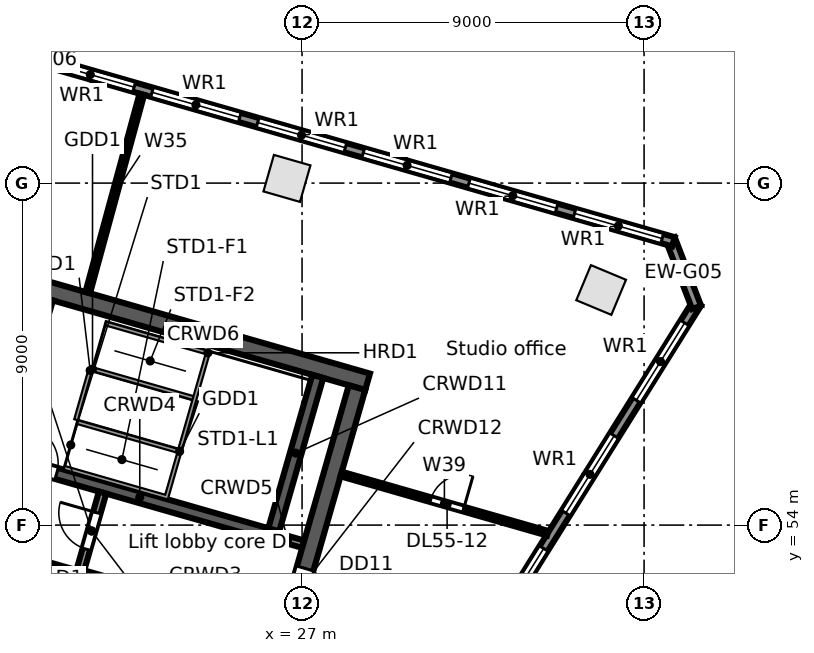
"""IFC4 building model, lengths in metres.
Left out: names, types, materials, properties, quantities, classifications, styles, units other than length and angle.
Written with IfcOpenShell. Run it as: python <this file> out.ifc"""

import sys

from ifc_helpers import new_model, si_unit, direction, frame, frame_2d, origin, origin_2d, place, context, subcontext, project, spatial, rectangle, extrude, element, fill, save


model = new_model("IFC4")
c1 = context("Model", 3, precision=1e-05, world=origin(), true_north=direction((0.0, 1.0)))
c2 = subcontext(c1, "Body", "Model", "MODEL_VIEW")
j1 = project(units=[si_unit("LENGTHUNIT", "METRE"), si_unit("PLANEANGLEUNIT", "RADIAN")], contexts=[c1])
p1 = place(None, origin())
s1 = spatial("IfcSite", under=j1, at=p1, CompositionType="ELEMENT")
p2 = place(p1, origin())
s2 = spatial("IfcBuilding", under=s1, at=p2, CompositionType="ELEMENT")
p3 = place(p2, frame((0.0, 0.0, 250.4)))
s3 = spatial("IfcBuildingStorey", under=s2, at=p3, CompositionType="ELEMENT", Elevation=250.4)
for number, where, z_axis, x_axis in (
    (1, (26.603, 63.124, 0.0), (0.0, 0.0, 1.0), (-0.961, 0.276, 0.0)),
    (2, (34.87, 60.187, 0.0), (0.0, 0.0, 1.0), (-0.923, 0.385, 0.0)),
):
    element("IfcColumn", number, at=place(p3, frame(where, z_axis=z_axis, x_axis=x_axis)), inside=s3, PredefinedType="COLUMN", context=c2, shape_type="SweptSolid", body=[
        extrude(rectangle(XDim=1.0, YDim=1.0, at=origin_2d()), origin(), (0.0, 0.0, 1.0), 3.9),
    ])
p4 = place(p3, frame((37.392, 59.84, 0.0), z_axis=(0.0, 0.0, 1.0), x_axis=(-0.529919909431, -0.848047692992, 0.0)))
e3 = element("IfcWall", 3, at=p4, inside=s3, PredefinedType="STANDARD", context=c2, shape_type="SweptSolid", body=[
    extrude(rectangle(XDim=21.104, YDim=0.25, at=frame_2d((10.552, 0.0))), origin(), (0.0, 0.0, 1.0), 3.62),
])
p5 = place(p4, frame((18.112, 0.0, 0.8)))
e4 = element("IfcOpeningElement", 4, at=p5, cuts=e3, PredefinedType="OPENING", context=c2, shape_type="SweptSolid", body=[
    extrude(rectangle(XDim=2.4, YDim=2.2, at=frame_2d((1.2, 1.1))), frame((0.0, 0.135, 0.0), z_axis=(0.0, -1.0, 0.0), x_axis=(1.0, 0.0, 0.0)), (0.0, 0.0, 1.0), 0.27),
])
p6 = place(p4, frame((14.612, 0.0, 0.8)))
e5 = element("IfcOpeningElement", 5, at=p6, cuts=e3, PredefinedType="OPENING", context=c2, shape_type="SweptSolid", body=[
    extrude(rectangle(XDim=2.4, YDim=2.2, at=frame_2d((1.2, 1.1))), frame((0.0, 0.135, 0.0), z_axis=(0.0, -1.0, 0.0), x_axis=(1.0, 0.0, 0.0)), (0.0, 0.0, 1.0), 0.27),
])
p7 = place(p4, frame((11.112, 0.0, 0.8)))
e6 = element("IfcOpeningElement", 6, at=p7, cuts=e3, PredefinedType="OPENING", context=c2, shape_type="SweptSolid", body=[
    extrude(rectangle(XDim=2.4, YDim=2.2, at=frame_2d((1.2, 1.1))), frame((0.0, 0.135, 0.0), z_axis=(0.0, -1.0, 0.0), x_axis=(1.0, 0.0, 0.0)), (0.0, 0.0, 1.0), 0.27),
])
p8 = place(p4, frame((7.612, 0.0, 0.8)))
e7 = element("IfcOpeningElement", 7, at=p8, cuts=e3, PredefinedType="OPENING", context=c2, shape_type="SweptSolid", body=[
    extrude(rectangle(XDim=2.4, YDim=2.2, at=frame_2d((1.2, 1.1))), frame((0.0, 0.135, 0.0), z_axis=(0.0, -1.0, 0.0), x_axis=(1.0, 0.0, 0.0)), (0.0, 0.0, 1.0), 0.27),
])
p9 = place(p4, frame((4.112, 0.0, 0.8)))
e8 = element("IfcOpeningElement", 8, at=p9, cuts=e3, PredefinedType="OPENING", context=c2, shape_type="SweptSolid", body=[
    extrude(rectangle(XDim=2.4, YDim=2.2, at=frame_2d((1.2, 1.1))), frame((0.0, 0.135, 0.0), z_axis=(0.0, -1.0, 0.0), x_axis=(1.0, 0.0, 0.0)), (0.0, 0.0, 1.0), 0.27),
])
p10 = place(p4, frame((0.612, 0.0, 0.8)))
e9 = element("IfcOpeningElement", 9, at=p10, cuts=e3, PredefinedType="OPENING", context=c2, shape_type="SweptSolid", body=[
    extrude(rectangle(XDim=2.4, YDim=2.2, at=frame_2d((1.2, 1.1))), frame((0.0, 0.135, 0.0), z_axis=(0.0, -1.0, 0.0), x_axis=(1.0, 0.0, 0.0)), (0.0, 0.0, 1.0), 0.27),
])
p11 = place(p3, frame((36.69, 61.531, 0.0), z_axis=(0.0, 0.0, 1.0), x_axis=(0.358377147136, -0.933576895821, 0.0)))
e10 = element("IfcWall", 10, at=p11, inside=s3, PredefinedType="STANDARD", context=c2, shape_type="SweptSolid", body=[
    extrude(rectangle(XDim=1.93, YDim=0.25, at=frame_2d((0.965, 0.0))), origin(), (0.0, 0.0, 1.0), 3.62),
])
p12 = place(p3, frame((3.34, 71.042, 0.0), z_axis=(0.0, 0.0, 1.0), x_axis=(0.96126179431, -0.275637012753, 0.0)))
e11 = element("IfcWall", 11, at=p12, inside=s3, PredefinedType="STANDARD", context=c2, shape_type="SweptSolid", body=[
    extrude(rectangle(XDim=34.779, YDim=0.25, at=frame_2d((17.39, 0.0))), origin(), (0.0, 0.0, 1.0), 3.62),
])
p13 = place(p12, frame((32.071, 0.0, 0.8)))
e12 = element("IfcOpeningElement", 12, at=p13, cuts=e11, PredefinedType="OPENING", context=c2, shape_type="SweptSolid", body=[
    extrude(rectangle(XDim=2.4, YDim=2.2, at=frame_2d((1.2, 1.1))), frame((0.0, 0.135, 0.0), z_axis=(0.0, -1.0, 0.0), x_axis=(1.0, 0.0, 0.0)), (0.0, 0.0, 1.0), 0.27),
])
p14 = place(p12, frame((29.18, 0.0, 0.8)))
e13 = element("IfcOpeningElement", 13, at=p14, cuts=e11, PredefinedType="OPENING", context=c2, shape_type="SweptSolid", body=[
    extrude(rectangle(XDim=2.4, YDim=2.2, at=frame_2d((1.2, 1.1))), frame((0.0, 0.135, 0.0), z_axis=(0.0, -1.0, 0.0), x_axis=(1.0, 0.0, 0.0)), (0.0, 0.0, 1.0), 0.27),
])
p15 = place(p12, frame((26.289, 0.0, 0.8)))
e14 = element("IfcOpeningElement", 14, at=p15, cuts=e11, PredefinedType="OPENING", context=c2, shape_type="SweptSolid", body=[
    extrude(rectangle(XDim=2.4, YDim=2.2, at=frame_2d((1.2, 1.1))), frame((0.0, 0.135, 0.0), z_axis=(0.0, -1.0, 0.0), x_axis=(1.0, 0.0, 0.0)), (0.0, 0.0, 1.0), 0.27),
])
p16 = place(p12, frame((23.398, 0.0, 0.8)))
e15 = element("IfcOpeningElement", 15, at=p16, cuts=e11, PredefinedType="OPENING", context=c2, shape_type="SweptSolid", body=[
    extrude(rectangle(XDim=2.4, YDim=2.2, at=frame_2d((1.2, 1.1))), frame((0.0, 0.135, 0.0), z_axis=(0.0, -1.0, 0.0), x_axis=(1.0, 0.0, 0.0)), (0.0, 0.0, 1.0), 0.27),
])
p17 = place(p12, frame((20.508, 0.0, 0.8)))
e16 = element("IfcOpeningElement", 16, at=p17, cuts=e11, PredefinedType="OPENING", context=c2, shape_type="SweptSolid", body=[
    extrude(rectangle(XDim=2.4, YDim=2.2, at=frame_2d((1.2, 1.1))), frame((0.0, 0.135, 0.0), z_axis=(0.0, -1.0, 0.0), x_axis=(1.0, 0.0, 0.0)), (0.0, 0.0, 1.0), 0.27),
])
p18 = place(p12, frame((17.616, 0.0, 0.8)))
e17 = element("IfcOpeningElement", 17, at=p18, cuts=e11, PredefinedType="OPENING", context=c2, shape_type="SweptSolid", body=[
    extrude(rectangle(XDim=2.4, YDim=2.2, at=frame_2d((1.2, 1.1))), frame((0.0, 0.135, 0.0), z_axis=(0.0, -1.0, 0.0), x_axis=(1.0, 0.0, 0.0)), (0.0, 0.0, 1.0), 0.27),
])
p19 = place(p12, frame((14.726, 0.0, 0.8)))
e18 = element("IfcOpeningElement", 18, at=p19, cuts=e11, PredefinedType="OPENING", context=c2, shape_type="SweptSolid", body=[
    extrude(rectangle(XDim=2.4, YDim=2.2, at=frame_2d((1.2, 1.1))), frame((0.0, 0.135, 0.0), z_axis=(0.0, -1.0, 0.0), x_axis=(1.0, 0.0, 0.0)), (0.0, 0.0, 1.0), 0.27),
])
p20 = place(p12, frame((11.834, 0.0, 0.8)))
e19 = element("IfcOpeningElement", 19, at=p20, cuts=e11, PredefinedType="OPENING", context=c2, shape_type="SweptSolid", body=[
    extrude(rectangle(XDim=2.4, YDim=2.2, at=frame_2d((1.2, 1.1))), frame((0.0, 0.135, 0.0), z_axis=(0.0, -1.0, 0.0), x_axis=(1.0, 0.0, 0.0)), (0.0, 0.0, 1.0), 0.27),
])
p21 = place(p12, frame((8.944, 0.0, 0.8)))
e20 = element("IfcOpeningElement", 20, at=p21, cuts=e11, PredefinedType="OPENING", context=c2, shape_type="SweptSolid", body=[
    extrude(rectangle(XDim=2.4, YDim=2.2, at=frame_2d((1.2, 1.1))), frame((0.0, 0.135, 0.0), z_axis=(0.0, -1.0, 0.0), x_axis=(1.0, 0.0, 0.0)), (0.0, 0.0, 1.0), 0.27),
])
p22 = place(p12, frame((6.052, 0.0, 0.8)))
e21 = element("IfcOpeningElement", 21, at=p22, cuts=e11, PredefinedType="OPENING", context=c2, shape_type="SweptSolid", body=[
    extrude(rectangle(XDim=2.4, YDim=2.2, at=frame_2d((1.2, 1.1))), frame((0.0, 0.135, 0.0), z_axis=(0.0, -1.0, 0.0), x_axis=(1.0, 0.0, 0.0)), (0.0, 0.0, 1.0), 0.27),
])
p23 = place(p12, frame((3.162, 0.0, 0.8)))
e22 = element("IfcOpeningElement", 22, at=p23, cuts=e11, PredefinedType="OPENING", context=c2, shape_type="SweptSolid", body=[
    extrude(rectangle(XDim=2.4, YDim=2.2, at=frame_2d((1.2, 1.1))), frame((0.0, 0.135, 0.0), z_axis=(0.0, -1.0, 0.0), x_axis=(1.0, 0.0, 0.0)), (0.0, 0.0, 1.0), 0.27),
])
p24 = place(p12, frame((0.271, 0.0, 0.8)))
e23 = element("IfcOpeningElement", 23, at=p24, cuts=e11, PredefinedType="OPENING", context=c2, shape_type="SweptSolid", body=[
    extrude(rectangle(XDim=2.4, YDim=2.2, at=frame_2d((1.2, 1.1))), frame((0.0, 0.135, 0.0), z_axis=(0.0, -1.0, 0.0), x_axis=(1.0, 0.0, 0.0)), (0.0, 0.0, 1.0), 0.27),
])
p25 = place(p3, frame((18.583, 53.423, 0.0), z_axis=(0.0, 0.0, 1.0), x_axis=(0.961259287968, -0.275645753268, 0.0)))
e24 = element("IfcWall", 24, at=p25, inside=s3, PredefinedType="SOLIDWALL", context=c2, shape_type="SweptSolid", body=[
    extrude(rectangle(XDim=2.65, YDim=0.2, at=frame_2d((1.325, 0.0))), origin(), (0.0, 0.0, 1.0), 3.62),
])
p26 = place(p3, frame((21.131, 52.692, 0.0), z_axis=(0.0, 0.0, 1.0), x_axis=(0.961261488075, -0.275638080722, 0.0)))
e25 = element("IfcWall", 25, at=p26, inside=s3, PredefinedType="SOLIDWALL", context=c2, shape_type="SweptSolid", body=[
    extrude(rectangle(XDim=5.45, YDim=0.3, at=frame_2d((2.725, 0.0))), origin(), (0.0, 0.0, 1.0), 3.62),
])
p27 = place(p26, frame((0.95, 0.0, 0.0)))
e26 = element("IfcOpeningElement", 26, at=p27, cuts=e25, PredefinedType="OPENING", context=c2, shape_type="SweptSolid", body=[
    extrude(rectangle(XDim=0.9, YDim=2.1, at=frame_2d((0.45, 1.05))), frame((0.0, 0.16, 0.0), z_axis=(0.0, -1.0, 0.0), x_axis=(1.0, 0.0, 0.0)), (0.0, 0.0, 1.0), 0.32),
])
p28 = place(p26, frame((3.75, 0.0, 0.0)))
e27 = element("IfcOpeningElement", 27, at=p28, cuts=e25, PredefinedType="OPENING", context=c2, shape_type="SweptSolid", body=[
    extrude(rectangle(XDim=0.9, YDim=2.1, at=frame_2d((0.45, 1.05))), frame((0.0, 0.16, 0.0), z_axis=(0.0, -1.0, 0.0), x_axis=(1.0, 0.0, 0.0)), (0.0, 0.0, 1.0), 0.32),
])
p29 = place(p3, frame((19.245, 55.73, 0.0), z_axis=(0.0, 0.0, 1.0), x_axis=(0.961263007877, -0.275632780503, 0.0)))
e28 = element("IfcWall", 28, at=p29, inside=s3, PredefinedType="SOLIDWALL", context=c2, shape_type="SweptSolid", body=[
    extrude(rectangle(XDim=7.25, YDim=0.3, at=frame_2d((3.625, 0.0))), origin(), (0.0, 0.0, 1.0), 3.62),
])
p30 = place(p29, frame((0.35, 0.0, 0.0)))
e29 = element("IfcOpeningElement", 29, at=p30, cuts=e28, PredefinedType="OPENING", context=c2, shape_type="SweptSolid", body=[
    extrude(rectangle(XDim=1.0, YDim=2.1, at=frame_2d((0.5, 1.05))), frame((0.0, 0.16, 0.0), z_axis=(0.0, -1.0, 0.0), x_axis=(1.0, 0.0, 0.0)), (0.0, 0.0, 1.0), 0.32),
])
p31 = place(p3, frame((26.214, 53.732, 0.0), z_axis=(0.0, 0.0, 1.0), x_axis=(0.961241665642, -0.275707200184, 0.0)))
e30 = element("IfcWall", 30, at=p31, inside=s3, PredefinedType="SOLIDWALL", context=c2, shape_type="SweptSolid", body=[
    extrude(rectangle(XDim=0.85, YDim=0.2, at=frame_2d((0.425, 0.0))), origin(), (0.0, 0.0, 1.0), 3.62),
])
p32 = place(p3, frame((20.073, 60.252, 0.0), z_axis=(0.0, 0.0, 1.0), x_axis=(0.96126248289, -0.275634611374, 0.0)))
e31 = element("IfcWall", 31, at=p32, inside=s3, PredefinedType="SOLIDWALL", context=c2, shape_type="SweptSolid", body=[
    extrude(rectangle(XDim=9.0, YDim=0.45, at=frame_2d((4.5, 0.0))), origin(), (0.0, 0.0, 1.0), 3.62),
])
p33 = place(p3, frame((17.168, 49.303, 0.0), z_axis=(0.0, 0.0, 1.0), x_axis=(0.275638974822, 0.961261231695, 0.0)))
e32 = element("IfcWall", 32, at=p33, inside=s3, PredefinedType="SOLIDWALL", context=c2, shape_type="SweptSolid", body=[
    extrude(rectangle(XDim=11.1, YDim=0.45, at=frame_2d((5.55, 0.0))), origin(), (0.0, 0.0, 1.0), 3.62),
])
p34 = place(p33, frame((4.95, 0.0, 0.0)))
e33 = element("IfcOpeningElement", 33, at=p34, cuts=e32, PredefinedType="OPENING", context=c2, shape_type="SweptSolid", body=[
    extrude(rectangle(XDim=1.2, YDim=2.1, at=frame_2d((0.6, 1.05))), frame((0.0, 0.235, 0.0), z_axis=(0.0, -1.0, 0.0), x_axis=(1.0, 0.0, 0.0)), (0.0, 0.0, 1.0), 0.47),
])
p35 = place(p3, frame((21.172, 52.837, 0.0), z_axis=(0.0, 0.0, 1.0), x_axis=(0.275657676022, 0.961255868981, 0.0)))
e34 = element("IfcWall", 34, at=p35, inside=s3, PredefinedType="PARTITIONING", context=c2, shape_type="SweptSolid", body=[
    extrude(rectangle(XDim=2.1, YDim=0.2, at=frame_2d((1.05, 0.0))), origin(), (0.0, 0.0, 1.0), 3.62),
])
p36 = place(p35, frame((0.55, 0.0, 0.0)))
e35 = element("IfcOpeningElement", 35, at=p36, cuts=e34, PredefinedType="OPENING", context=c2, shape_type="SweptSolid", body=[
    extrude(rectangle(XDim=1.0, YDim=2.1, at=frame_2d((0.5, 1.05))), frame((0.0, 0.11, 0.0), z_axis=(0.0, -1.0, 0.0), x_axis=(1.0, 0.0, 0.0)), (0.0, 0.0, 1.0), 0.22),
])
p37 = place(p3, frame((26.256, 53.876, 0.0), z_axis=(0.0, 0.0, 1.0), x_axis=(0.275588560745, 0.96127568636, 0.0)))
e36 = element("IfcWall", 36, at=p37, inside=s3, PredefinedType="SOLIDWALL", context=c2, shape_type="SweptSolid", body=[
    extrude(rectangle(XDim=4.2, YDim=0.3, at=frame_2d((2.1, 0.0))), origin(), (0.0, 0.0, 1.0), 3.62),
])
p38 = place(p3, frame((25.387, 46.947, 0.0), z_axis=(0.0, 0.0, 1.0), x_axis=(0.275638974822, 0.961261231695, 0.0)))
e37 = element("IfcWall", 37, at=p38, inside=s3, PredefinedType="SOLIDWALL", context=c2, shape_type="SweptSolid", body=[
    extrude(rectangle(XDim=11.1, YDim=0.45, at=frame_2d((5.55, 0.0))), origin(), (0.0, 0.0, 1.0), 3.62),
])
p39 = place(p38, frame((4.95, 0.0, 0.0)))
e38 = element("IfcOpeningElement", 38, at=p39, cuts=e37, PredefinedType="OPENING", context=c2, shape_type="SweptSolid", body=[
    extrude(rectangle(XDim=1.2, YDim=2.1, at=frame_2d((0.6, 1.05))), frame((0.0, 0.235, 0.0), z_axis=(0.0, -1.0, 0.0), x_axis=(1.0, 0.0, 0.0)), (0.0, 0.0, 1.0), 0.47),
])
p40 = place(p3, frame((21.36, 60.117, 0.0), z_axis=(0.0, 0.0, 1.0), x_axis=(0.263151767798, 0.964754449124, 0.0)))
e39 = element("IfcWall", 39, at=p40, inside=s3, PredefinedType="PARTITIONING", context=c2, shape_type="SweptSolid", body=[
    extrude(rectangle(XDim=5.411, YDim=0.125, at=frame_2d((2.705, 0.0))), origin(), (0.0, 0.0, 1.0), 3.0),
])
p41 = place(p3, frame((28.029, 55.344, 0.0), z_axis=(0.0, 0.0, 1.0), x_axis=(0.961249621014, -0.275679462603, 0.0)))
e40 = element("IfcWall", 40, at=p41, inside=s3, PredefinedType="PARTITIONING", context=c2, shape_type="SweptSolid", body=[
    extrude(rectangle(XDim=5.652, YDim=0.125, at=frame_2d((2.826, 0.0))), origin(), (0.0, 0.0, 1.0), 2.988),
])
p42 = place(p41, frame((2.45, 0.0, 0.0)))
e41 = element("IfcOpeningElement", 41, at=p42, cuts=e40, PredefinedType="OPENING", context=c2, shape_type="SweptSolid", body=[
    extrude(rectangle(XDim=0.9, YDim=2.1, at=frame_2d((0.45, 1.05))), frame((0.0, 0.073, 0.0), z_axis=(0.0, -1.0, 0.0), x_axis=(1.0, 0.0, 0.0)), (0.0, 0.0, 1.0), 0.145),
])
p43 = place(p8, origin())
e42 = element("IfcWindow", 42, at=p43, inside=s3, PartitioningType="SINGLE_PANEL", PredefinedType="WINDOW", context=c2, shape_type="SweptSolid", body=[
    extrude(rectangle(XDim=2.4, YDim=2.2, at=frame_2d((1.2, 1.1))), frame((0.0, 0.03, 0.0), z_axis=(0.0, -1.0, 0.0), x_axis=(1.0, 0.0, 0.0)), (0.0, 0.0, 1.0), 0.06),
])
fill(e7, e42)
p44 = place(p9, origin())
e43 = element("IfcWindow", 43, at=p44, inside=s3, PartitioningType="SINGLE_PANEL", PredefinedType="WINDOW", context=c2, shape_type="SweptSolid", body=[
    extrude(rectangle(XDim=2.4, YDim=2.2, at=frame_2d((1.2, 1.1))), frame((0.0, 0.03, 0.0), z_axis=(0.0, -1.0, 0.0), x_axis=(1.0, 0.0, 0.0)), (0.0, 0.0, 1.0), 0.06),
])
fill(e8, e43)
p45 = place(p10, origin())
e44 = element("IfcWindow", 44, at=p45, inside=s3, PartitioningType="SINGLE_PANEL", PredefinedType="WINDOW", context=c2, shape_type="SweptSolid", body=[
    extrude(rectangle(XDim=2.4, YDim=2.2, at=frame_2d((1.2, 1.1))), frame((0.0, 0.03, 0.0), z_axis=(0.0, -1.0, 0.0), x_axis=(1.0, 0.0, 0.0)), (0.0, 0.0, 1.0), 0.06),
])
fill(e9, e44)
p46 = place(p13, origin())
e45 = element("IfcWindow", 45, at=p46, inside=s3, PartitioningType="SINGLE_PANEL", PredefinedType="WINDOW", context=c2, shape_type="SweptSolid", body=[
    extrude(rectangle(XDim=2.4, YDim=2.2, at=frame_2d((1.2, 1.1))), frame((0.0, 0.03, 0.0), z_axis=(0.0, -1.0, 0.0), x_axis=(1.0, 0.0, 0.0)), (0.0, 0.0, 1.0), 0.06),
])
fill(e12, e45)
p47 = place(p14, origin())
e46 = element("IfcWindow", 46, at=p47, inside=s3, PartitioningType="SINGLE_PANEL", PredefinedType="WINDOW", context=c2, shape_type="SweptSolid", body=[
    extrude(rectangle(XDim=2.4, YDim=2.2, at=frame_2d((1.2, 1.1))), frame((0.0, 0.03, 0.0), z_axis=(0.0, -1.0, 0.0), x_axis=(1.0, 0.0, 0.0)), (0.0, 0.0, 1.0), 0.06),
])
fill(e13, e46)
p48 = place(p15, origin())
e47 = element("IfcWindow", 47, at=p48, inside=s3, PartitioningType="SINGLE_PANEL", PredefinedType="WINDOW", context=c2, shape_type="SweptSolid", body=[
    extrude(rectangle(XDim=2.4, YDim=2.2, at=frame_2d((1.2, 1.1))), frame((0.0, 0.03, 0.0), z_axis=(0.0, -1.0, 0.0), x_axis=(1.0, 0.0, 0.0)), (0.0, 0.0, 1.0), 0.06),
])
fill(e14, e47)
p49 = place(p16, origin())
e48 = element("IfcWindow", 48, at=p49, inside=s3, PartitioningType="SINGLE_PANEL", PredefinedType="WINDOW", context=c2, shape_type="SweptSolid", body=[
    extrude(rectangle(XDim=2.4, YDim=2.2, at=frame_2d((1.2, 1.1))), frame((0.0, 0.03, 0.0), z_axis=(0.0, -1.0, 0.0), x_axis=(1.0, 0.0, 0.0)), (0.0, 0.0, 1.0), 0.06),
])
fill(e15, e48)
p50 = place(p17, origin())
e49 = element("IfcWindow", 49, at=p50, inside=s3, PartitioningType="SINGLE_PANEL", PredefinedType="WINDOW", context=c2, shape_type="SweptSolid", body=[
    extrude(rectangle(XDim=2.4, YDim=2.2, at=frame_2d((1.2, 1.1))), frame((0.0, 0.03, 0.0), z_axis=(0.0, -1.0, 0.0), x_axis=(1.0, 0.0, 0.0)), (0.0, 0.0, 1.0), 0.06),
])
fill(e16, e49)
p51 = place(p18, origin())
e50 = element("IfcWindow", 50, at=p51, inside=s3, PartitioningType="SINGLE_PANEL", PredefinedType="WINDOW", context=c2, shape_type="SweptSolid", body=[
    extrude(rectangle(XDim=2.4, YDim=2.2, at=frame_2d((1.2, 1.1))), frame((0.0, 0.03, 0.0), z_axis=(0.0, -1.0, 0.0), x_axis=(1.0, 0.0, 0.0)), (0.0, 0.0, 1.0), 0.06),
])
fill(e17, e50)
p52 = place(p30, origin())
e51 = element("IfcDoor", 51, at=p52, inside=s3, OperationType="SINGLE_SWING_LEFT", PredefinedType="DOOR", context=c2, shape_type="SweptSolid", body=[
    extrude(rectangle(XDim=1.0, YDim=2.1, at=frame_2d((0.5, 1.05))), frame((0.0, 0.025, 0.0), z_axis=(0.0, -1.0, 0.0), x_axis=(1.0, 0.0, 0.0)), (0.0, 0.0, 1.0), 0.05),
])
fill(e29, e51)
p53 = place(p36, origin())
e52 = element("IfcDoor", 52, at=p53, inside=s3, OperationType="SINGLE_SWING_RIGHT", PredefinedType="DOOR", context=c2, shape_type="SweptSolid", body=[
    extrude(rectangle(XDim=1.0, YDim=2.1, at=frame_2d((0.5, 1.05))), frame((0.0, 0.025, 0.0), z_axis=(0.0, -1.0, 0.0), x_axis=(1.0, 0.0, 0.0)), (0.0, 0.0, 1.0), 0.05),
])
fill(e35, e52)
p54 = place(p39, frame((1.2, 0.0, 0.0), z_axis=(0.0, 0.0, 1.0), x_axis=(-1.0, 0.0, 0.0)))
e53 = element("IfcDoor", 53, at=p54, inside=s3, OperationType="SINGLE_SWING_RIGHT", PredefinedType="DOOR", context=c2, shape_type="SweptSolid", body=[
    extrude(rectangle(XDim=1.2, YDim=2.1, at=frame_2d((0.6, 1.05))), frame((0.0, 0.025, 0.0), z_axis=(0.0, -1.0, 0.0), x_axis=(1.0, 0.0, 0.0)), (0.0, 0.0, 1.0), 0.05),
])
fill(e38, e53)
p55 = place(p42, origin())
e54 = element("IfcDoor", 54, at=p55, inside=s3, OperationType="SINGLE_SWING_RIGHT", PredefinedType="DOOR", context=c2, shape_type="SweptSolid", body=[
    extrude(rectangle(XDim=0.9, YDim=2.1, at=frame_2d((0.45, 1.05))), frame((0.0, 0.025, 0.0), z_axis=(0.0, -1.0, 0.0), x_axis=(1.0, 0.0, 0.0)), (0.0, 0.0, 1.0), 0.05),
])
fill(e41, e54)
save(model, sys.argv[1])
